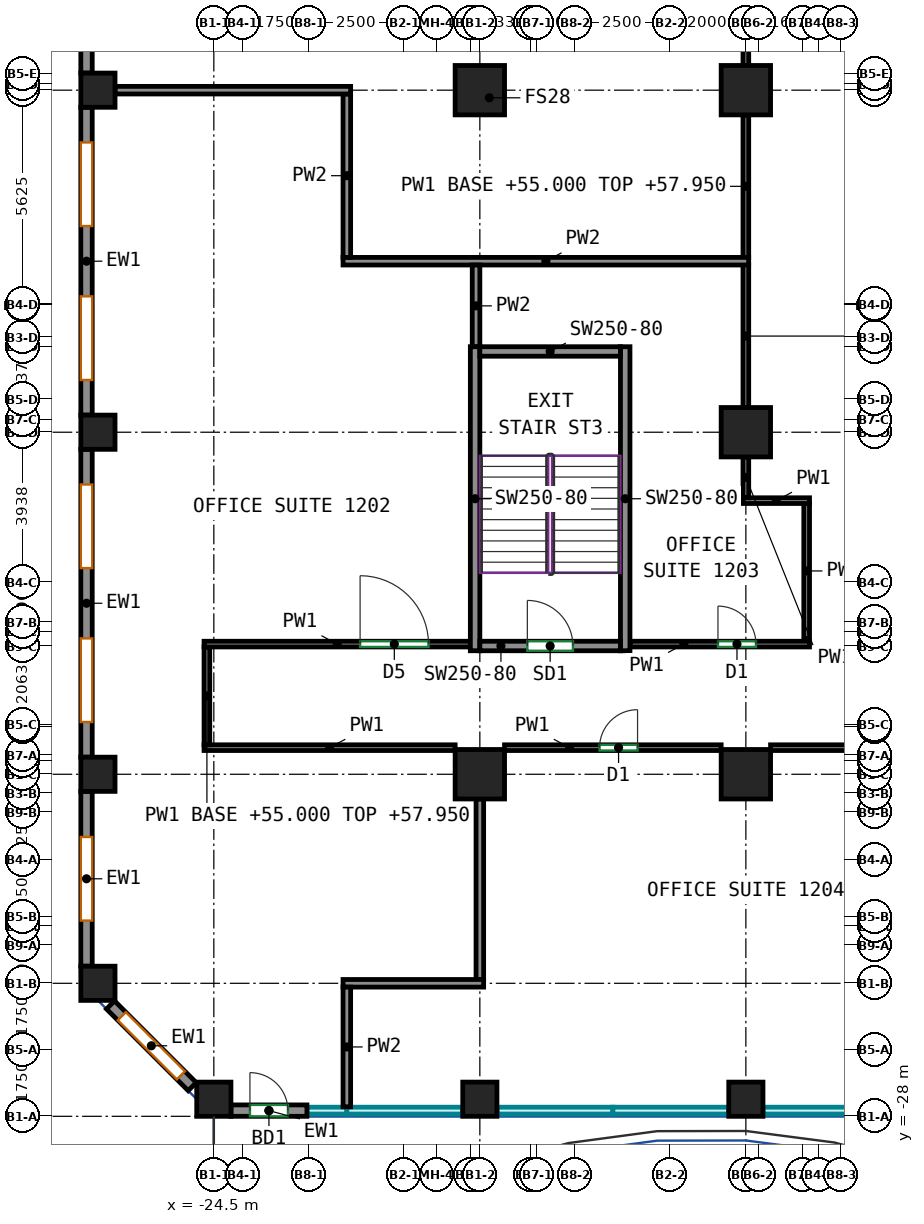
"""IFC4 building model, lengths in metres.
Left out: names, types, materials, properties, quantities, classifications, styles, units other than length and angle.
Written with IfcOpenShell. Run it as: python <this file> out.ifc"""

import sys

from ifc_helpers import new_model, si_unit, direction, frame, frame_2d, origin, origin_2d, place, context, subcontext, project, spatial, rectangle, extrude, source, transform, mapped, element, fill, save


model = new_model("IFC4")
c1 = context("Model", 3, precision=1e-05, world=origin(), true_north=direction((0.0, 1.0)))
c2 = subcontext(c1, "Body", "Model", "MODEL_VIEW")
j1 = project(units=[si_unit("LENGTHUNIT", "METRE"), si_unit("PLANEANGLEUNIT", "RADIAN")], contexts=[c1])
p1 = place(None, origin())
s1 = spatial("IfcSite", under=j1, at=p1, CompositionType="ELEMENT")
p2 = place(p1, origin())
s2 = spatial("IfcBuilding", under=s1, at=p2, CompositionType="ELEMENT")
p3 = place(p2, frame((0.0, 0.0, 55.0)))
s3 = spatial("IfcBuildingStorey", under=s2, at=p3, CompositionType="ELEMENT", Elevation=55.0)
m1 = source(origin(), c2, "Body", "SweptSolid", [
    extrude(rectangle(XDim=0.9, YDim=0.9, at=origin_2d()), origin(), (0.0, 0.0, 1.0), 3.6),
])
for number, where, z_axis, x_axis in (
    (1, (-27.55, -24.5, 0.0), (0.0, 0.0, 1.0), (1.0, 0.0, 0.0)),
    (2, (-27.55, -19.0, 0.0), (0.0, 0.0, 1.0), (1.0, 0.0, 0.0)),
    (3, (-27.55, -10.0, 0.0), (0.0, 0.0, 1.0), (1.0, 0.0, 0.0)),
    (4, (-27.55, -1.0, 0.0), (0.0, 0.0, 1.0), (1.0, 0.0, 0.0)),
    (5, (-24.5, -27.55, 0.0), (0.0, 0.0, 1.0), (1.0, 0.0, 0.0)),
    (6, (-17.5, -27.55, 0.0), (0.0, 0.0, 1.0), (1.0, 0.0, 0.0)),
):
    element("IfcColumn", number, at=place(p3, frame(where, z_axis=z_axis, x_axis=x_axis)), inside=s3, PredefinedType="COLUMN", context=c2, shape_type="MappedRepresentation", body=[
        mapped(m1, transform((0.0, 0.0, 0.0))),
    ])
m2 = source(origin(), c2, "Body", "SweptSolid", [
    extrude(rectangle(XDim=1.3, YDim=1.3, at=origin_2d()), origin(), (0.0, 0.0, 1.0), 3.6),
])
for number, where, z_axis, x_axis in (
    (7, (-17.5, -19.0, 0.0), (0.0, 0.0, 1.0), (1.0, 0.0, 0.0)),
    (8, (-17.5, -1.0, 0.0), (0.0, 0.0, 1.0), (1.0, 0.0, 0.0)),
):
    element("IfcColumn", number, at=place(p3, frame(where, z_axis=z_axis, x_axis=x_axis)), inside=s3, PredefinedType="COLUMN", context=c2, shape_type="MappedRepresentation", body=[
        mapped(m2, transform((0.0, 0.0, 0.0))),
    ])
p4 = place(p3, frame((-10.5, -27.55, 0.0), z_axis=(0.0, 0.0, 1.0), x_axis=(1.0, 0.0, 0.0)))
e9 = element("IfcColumn", 9, at=p4, inside=s3, PredefinedType="COLUMN", context=c2, shape_type="MappedRepresentation", body=[
    mapped(m1, transform((0.0, 0.0, 0.0))),
])
for number, where, z_axis, x_axis in (
    (10, (-10.5, -19.0, 0.0), (0.0, 0.0, 1.0), (1.0, 0.0, 0.0)),
    (11, (-10.5, -10.0, 0.0), (0.0, 0.0, 1.0), (1.0, 0.0, 0.0)),
    (12, (-10.5, -1.0, 0.0), (0.0, 0.0, 1.0), (1.0, 0.0, 0.0)),
):
    element("IfcColumn", number, at=place(p3, frame(where, z_axis=z_axis, x_axis=x_axis)), inside=s3, PredefinedType="COLUMN", context=c2, shape_type="MappedRepresentation", body=[
        mapped(m2, transform((0.0, 0.0, 0.0))),
    ])
m3 = source(origin(), c2, "Body", "SweptSolid", [
    extrude(rectangle(XDim=8.0, YDim=0.25, at=frame_2d((4.0, 0.0))), origin(), (0.0, 0.0, 1.0), 3.6),
])
for number, where, z_axis, x_axis in (
    (13, (-17.625, -15.75, 0.0), (0.0, 0.0, 1.0), (0.0, 1.0, 0.0)),
    (14, (-13.675, -15.75, 0.0), (0.0, 0.0, 1.0), (0.0, 1.0, 0.0)),
):
    element("IfcWall", number, at=place(p3, frame(where, z_axis=z_axis, x_axis=x_axis)), inside=s3, PredefinedType="SHEAR", context=c2, shape_type="MappedRepresentation", body=[
        mapped(m3, transform((0.0, 0.0, 0.0))),
    ])
m4 = source(origin(), c2, "Body", "SweptSolid", [
    extrude(rectangle(XDim=3.7, YDim=0.25, at=frame_2d((1.85, 0.0))), origin(), (0.0, 0.0, 1.0), 3.6),
])
p5 = place(p3, frame((-17.5, -15.625, 0.0), z_axis=(0.0, 0.0, 1.0), x_axis=(1.0, 0.0, 0.0)))
e15 = element("IfcWall", 15, at=p5, inside=s3, PredefinedType="SHEAR", context=c2, shape_type="MappedRepresentation", body=[
    mapped(m4, transform((0.0, 0.0, 0.0))),
])
p6 = place(p5, frame((1.25, 0.0, 0.0)))
e16 = element("IfcOpeningElement", 16, at=p6, cuts=e15, PredefinedType="OPENING", context=c2, shape_type="SweptSolid", body=[
    extrude(rectangle(XDim=1.2, YDim=2.1, at=frame_2d((0.6, 1.05))), frame((0.0, 0.135, 0.0), z_axis=(0.0, -1.0, 0.0), x_axis=(1.0, 0.0, 0.0)), (0.0, 0.0, 1.0), 0.27),
])
p7 = place(p3, frame((-17.5, -7.875, 0.0), z_axis=(0.0, 0.0, 1.0), x_axis=(1.0, 0.0, 0.0)))
e17 = element("IfcWall", 17, at=p7, inside=s3, PredefinedType="SHEAR", context=c2, shape_type="MappedRepresentation", body=[
    mapped(m4, transform((0.0, 0.0, 0.0))),
])
m5 = source(origin(), c2, "Body", "SweptSolid", [
    extrude(rectangle(XDim=2.0, YDim=0.3, at=frame_2d((1.0, 0.0))), origin(), (0.0, 0.0, 1.0), 3.6),
])
p8 = place(p3, frame((-24.05, -27.85, 0.0), z_axis=(0.0, 0.0, 1.0), x_axis=(1.0, 0.0, 0.0)))
e18 = element("IfcWall", 18, at=p8, inside=s3, PredefinedType="SOLIDWALL", context=c2, shape_type="MappedRepresentation", body=[
    mapped(m5, transform((0.0, 0.0, 0.0))),
])
p9 = place(p8, frame((0.5, 0.0, 0.0)))
e19 = element("IfcOpeningElement", 19, at=p9, cuts=e18, PredefinedType="OPENING", context=c2, shape_type="SweptSolid", body=[
    extrude(rectangle(XDim=1.0, YDim=2.1, at=frame_2d((0.5, 1.05))), frame((0.0, 0.16, 0.0), z_axis=(0.0, -1.0, 0.0), x_axis=(1.0, 0.0, 0.0)), (0.0, 0.0, 1.0), 0.32),
])
m6 = source(origin(), c2, "Body", "SweptSolid", [
    extrude(rectangle(XDim=8.1, YDim=0.3, at=frame_2d((4.05, 0.0))), origin(), (0.0, 0.0, 1.0), 3.6),
])
p10 = place(p3, frame((-27.85, 7.55, 0.0), z_axis=(0.0, 0.0, 1.0), x_axis=(0.0, -1.0, 0.0)))
e20 = element("IfcWall", 20, at=p10, inside=s3, PredefinedType="SOLIDWALL", context=c2, shape_type="MappedRepresentation", body=[
    mapped(m6, transform((0.0, 0.0, 0.0))),
])
p11 = place(p10, frame((0.925, 0.0, 0.7)))
e21 = element("IfcOpeningElement", 21, at=p11, cuts=e20, PredefinedType="OPENING", context=c2, shape_type="SweptSolid", body=[
    extrude(rectangle(XDim=2.2, YDim=2.25, at=frame_2d((1.1, 1.125))), frame((0.0, 0.16, 0.0), z_axis=(0.0, -1.0, 0.0), x_axis=(1.0, 0.0, 0.0)), (0.0, 0.0, 1.0), 0.32),
])
p12 = place(p10, frame((4.975, 0.0, 0.7)))
e22 = element("IfcOpeningElement", 22, at=p12, cuts=e20, PredefinedType="OPENING", context=c2, shape_type="SweptSolid", body=[
    extrude(rectangle(XDim=2.2, YDim=2.25, at=frame_2d((1.1, 1.125))), frame((0.0, 0.16, 0.0), z_axis=(0.0, -1.0, 0.0), x_axis=(1.0, 0.0, 0.0)), (0.0, 0.0, 1.0), 0.32),
])
p13 = place(p3, frame((-27.85, -1.45, 0.0), z_axis=(0.0, 0.0, 1.0), x_axis=(0.0, -1.0, 0.0)))
e23 = element("IfcWall", 23, at=p13, inside=s3, PredefinedType="SOLIDWALL", context=c2, shape_type="MappedRepresentation", body=[
    mapped(m6, transform((0.0, 0.0, 0.0))),
])
p14 = place(p13, frame((0.925, 0.0, 0.7)))
e24 = element("IfcOpeningElement", 24, at=p14, cuts=e23, PredefinedType="OPENING", context=c2, shape_type="SweptSolid", body=[
    extrude(rectangle(XDim=2.2, YDim=2.25, at=frame_2d((1.1, 1.125))), frame((0.0, 0.16, 0.0), z_axis=(0.0, -1.0, 0.0), x_axis=(1.0, 0.0, 0.0)), (0.0, 0.0, 1.0), 0.32),
])
p15 = place(p13, frame((4.975, 0.0, 0.7)))
e25 = element("IfcOpeningElement", 25, at=p15, cuts=e23, PredefinedType="OPENING", context=c2, shape_type="SweptSolid", body=[
    extrude(rectangle(XDim=2.2, YDim=2.25, at=frame_2d((1.1, 1.125))), frame((0.0, 0.16, 0.0), z_axis=(0.0, -1.0, 0.0), x_axis=(1.0, 0.0, 0.0)), (0.0, 0.0, 1.0), 0.32),
])
p16 = place(p3, frame((-27.85, -10.45, 0.0), z_axis=(0.0, 0.0, 1.0), x_axis=(0.0, -1.0, 0.0)))
e26 = element("IfcWall", 26, at=p16, inside=s3, PredefinedType="SOLIDWALL", context=c2, shape_type="MappedRepresentation", body=[
    mapped(m6, transform((0.0, 0.0, 0.0))),
])
p17 = place(p16, frame((0.925, 0.0, 0.7)))
e27 = element("IfcOpeningElement", 27, at=p17, cuts=e26, PredefinedType="OPENING", context=c2, shape_type="SweptSolid", body=[
    extrude(rectangle(XDim=2.2, YDim=2.25, at=frame_2d((1.1, 1.125))), frame((0.0, 0.16, 0.0), z_axis=(0.0, -1.0, 0.0), x_axis=(1.0, 0.0, 0.0)), (0.0, 0.0, 1.0), 0.32),
])
p18 = place(p16, frame((4.975, 0.0, 0.7)))
e28 = element("IfcOpeningElement", 28, at=p18, cuts=e26, PredefinedType="OPENING", context=c2, shape_type="SweptSolid", body=[
    extrude(rectangle(XDim=2.2, YDim=2.25, at=frame_2d((1.1, 1.125))), frame((0.0, 0.16, 0.0), z_axis=(0.0, -1.0, 0.0), x_axis=(1.0, 0.0, 0.0)), (0.0, 0.0, 1.0), 0.32),
])
m7 = source(origin(), c2, "Body", "SweptSolid", [
    extrude(rectangle(XDim=4.6, YDim=0.3, at=frame_2d((2.3, 0.0))), origin(), (0.0, 0.0, 1.0), 3.6),
])
p19 = place(p3, frame((-27.85, -19.45, 0.0), z_axis=(0.0, 0.0, 1.0), x_axis=(0.0, -1.0, 0.0)))
e29 = element("IfcWall", 29, at=p19, inside=s3, PredefinedType="SOLIDWALL", context=c2, shape_type="MappedRepresentation", body=[
    mapped(m7, transform((0.0, 0.0, 0.0))),
])
p20 = place(p19, frame((1.2, 0.0, 0.7)))
e30 = element("IfcOpeningElement", 30, at=p20, cuts=e29, PredefinedType="OPENING", context=c2, shape_type="SweptSolid", body=[
    extrude(rectangle(XDim=2.2, YDim=2.25, at=frame_2d((1.1, 1.125))), frame((0.0, 0.16, 0.0), z_axis=(0.0, -1.0, 0.0), x_axis=(1.0, 0.0, 0.0)), (0.0, 0.0, 1.0), 0.32),
])
m8 = source(origin(), c2, "Body", "SweptSolid", [
    extrude(rectangle(XDim=3.041, YDim=0.3, at=frame_2d((1.521, 0.0))), origin(), (0.0, 0.0, 1.0), 3.6),
])
p21 = place(p3, frame((-27.219, -25.069, 0.0), z_axis=(0.0, 0.0, 1.0), x_axis=(0.707106781187, -0.707106781187, 0.0)))
e31 = element("IfcWall", 31, at=p21, inside=s3, PredefinedType="SOLIDWALL", context=c2, shape_type="MappedRepresentation", body=[
    mapped(m8, transform((0.0, 0.0, 0.0))),
])
p22 = place(p21, frame((0.42, 0.0, 0.7)))
e32 = element("IfcOpeningElement", 32, at=p22, cuts=e31, PredefinedType="OPENING", context=c2, shape_type="SweptSolid", body=[
    extrude(rectangle(XDim=2.2, YDim=2.25, at=frame_2d((1.1, 1.125))), frame((0.0, 0.16, 0.0), z_axis=(0.0, -1.0, 0.0), x_axis=(1.0, 0.0, 0.0)), (0.0, 0.0, 1.0), 0.32),
])
p23 = place(p3, frame((-10.5, -5.41, 0.0), z_axis=(0.0, 0.0, 1.0), x_axis=(0.0, 1.0, 0.0)))
e33 = element("IfcWall", 33, at=p23, inside=s3, PredefinedType="PARTITIONING", context=c2, shape_type="SweptSolid", body=[
    extrude(rectangle(XDim=3.76, YDim=0.15, at=frame_2d((1.88, 0.0))), origin(), (0.0, 0.0, 1.0), 2.95),
])
p24 = place(p3, frame((-10.5, -0.35, 0.0), z_axis=(0.0, 0.0, 1.0), x_axis=(0.0, 1.0, 0.0)))
e34 = element("IfcWall", 34, at=p24, inside=s3, PredefinedType="PARTITIONING", context=c2, shape_type="SweptSolid", body=[
    extrude(rectangle(XDim=3.775, YDim=0.15, at=frame_2d((1.888, 0.0))), origin(), (0.0, 0.0, 1.0), 3.6),
])
p25 = place(p3, frame((-24.757, -18.3, 0.0), z_axis=(0.0, 0.0, 1.0), x_axis=(1.0, 0.0, 0.0)))
e35 = element("IfcWall", 35, at=p25, inside=s3, PredefinedType="PARTITIONING", context=c2, shape_type="SweptSolid", body=[
    extrude(rectangle(XDim=6.607, YDim=0.15, at=frame_2d((3.304, 0.0))), origin(), (0.0, 0.0, 1.0), 3.6),
])
p26 = place(p3, frame((-24.682, -15.65, 0.0), z_axis=(0.0, 0.0, 1.0), x_axis=(0.0, -1.0, 0.0)))
e36 = element("IfcWall", 36, at=p26, inside=s3, PredefinedType="PARTITIONING", context=c2, shape_type="SweptSolid", body=[
    extrude(rectangle(XDim=2.575, YDim=0.15, at=frame_2d((1.288, 0.0))), origin(), (0.0, 0.0, 1.0), 2.95),
])
p27 = place(p3, frame((-24.757, -15.575, 0.0), z_axis=(0.0, 0.0, 1.0), x_axis=(1.0, 0.0, 0.0)))
e37 = element("IfcWall", 37, at=p27, inside=s3, PredefinedType="PARTITIONING", context=c2, shape_type="SweptSolid", body=[
    extrude(rectangle(XDim=7.007, YDim=0.15, at=frame_2d((3.503, 0.0))), origin(), (0.0, 0.0, 1.0), 3.6),
])
p28 = place(p27, frame((4.106, 0.0, 0.0)))
e38 = element("IfcOpeningElement", 38, at=p28, cuts=e37, PredefinedType="OPENING", context=c2, shape_type="SweptSolid", body=[
    extrude(rectangle(XDim=1.8, YDim=2.1, at=frame_2d((0.9, 1.05))), frame((0.0, 0.085, 0.0), z_axis=(0.0, -1.0, 0.0), x_axis=(1.0, 0.0, 0.0)), (0.0, 0.0, 1.0), 0.17),
])
p29 = place(p3, frame((-13.55, -15.575, 0.0), z_axis=(0.0, 0.0, 1.0), x_axis=(1.0, 0.0, 0.0)))
e39 = element("IfcWall", 39, at=p29, inside=s3, PredefinedType="PARTITIONING", context=c2, shape_type="SweptSolid", body=[
    extrude(rectangle(XDim=4.725, YDim=0.15, at=frame_2d((2.363, 0.0))), origin(), (0.0, 0.0, 1.0), 3.6),
])
p30 = place(p29, frame((2.316, 0.0, 0.0)))
e40 = element("IfcOpeningElement", 40, at=p30, cuts=e39, PredefinedType="OPENING", context=c2, shape_type="SweptSolid", body=[
    extrude(rectangle(XDim=1.0, YDim=2.1, at=frame_2d((0.5, 1.05))), frame((0.0, 0.085, 0.0), z_axis=(0.0, -1.0, 0.0), x_axis=(1.0, 0.0, 0.0)), (0.0, 0.0, 1.0), 0.17),
])
p31 = place(p3, frame((-8.9, -11.875, 0.0), z_axis=(0.0, 0.0, 1.0), x_axis=(0.0, -1.0, 0.0)))
e41 = element("IfcWall", 41, at=p31, inside=s3, PredefinedType="PARTITIONING", context=c2, shape_type="SweptSolid", body=[
    extrude(rectangle(XDim=3.55, YDim=0.15, at=frame_2d((1.775, 0.0))), origin(), (0.0, 0.0, 1.0), 3.6),
])
p32 = place(p3, frame((-10.575, -11.8, 0.0), z_axis=(0.0, 0.0, 1.0), x_axis=(1.0, 0.0, 0.0)))
e42 = element("IfcWall", 42, at=p32, inside=s3, PredefinedType="PARTITIONING", context=c2, shape_type="SweptSolid", body=[
    extrude(rectangle(XDim=1.75, YDim=0.15, at=frame_2d((0.875, 0.0))), origin(), (0.0, 0.0, 1.0), 3.6),
])
p33 = place(p3, frame((-10.5, -11.725, 0.0), z_axis=(0.0, 0.0, 1.0), x_axis=(0.0, 1.0, 0.0)))
e43 = element("IfcWall", 43, at=p33, inside=s3, PredefinedType="PARTITIONING", context=c2, shape_type="SweptSolid", body=[
    extrude(rectangle(XDim=1.075, YDim=0.15, at=frame_2d((0.538, 0.0))), origin(), (0.0, 0.0, 1.0), 2.95),
])
p34 = place(p3, frame((-10.5, -9.35, 0.0), z_axis=(0.0, 0.0, 1.0), x_axis=(0.0, 1.0, 0.0)))
e44 = element("IfcWall", 44, at=p34, inside=s3, PredefinedType="PARTITIONING", context=c2, shape_type="SweptSolid", body=[
    extrude(rectangle(XDim=3.76, YDim=0.15, at=frame_2d((1.88, 0.0))), origin(), (0.0, 0.0, 1.0), 2.95),
])
p35 = place(p3, frame((-16.85, -18.3, 0.0), z_axis=(0.0, 0.0, 1.0), x_axis=(1.0, 0.0, 0.0)))
e45 = element("IfcWall", 45, at=p35, inside=s3, PredefinedType="PARTITIONING", context=c2, shape_type="SweptSolid", body=[
    extrude(rectangle(XDim=5.7, YDim=0.15, at=frame_2d((2.85, 0.0))), origin(), (0.0, 0.0, 1.0), 3.6),
])
p36 = place(p35, frame((2.5, 0.0, 0.0)))
e46 = element("IfcOpeningElement", 46, at=p36, cuts=e45, PredefinedType="OPENING", context=c2, shape_type="SweptSolid", body=[
    extrude(rectangle(XDim=1.0, YDim=2.1, at=frame_2d((0.5, 1.05))), frame((0.0, 0.085, 0.0), z_axis=(0.0, -1.0, 0.0), x_axis=(1.0, 0.0, 0.0)), (0.0, 0.0, 1.0), 0.17),
])
p37 = place(p3, frame((-9.85, -18.3, 0.0), z_axis=(0.0, 0.0, 1.0), x_axis=(1.0, 0.0, 0.0)))
e47 = element("IfcWall", 47, at=p37, inside=s3, PredefinedType="PARTITIONING", context=c2, shape_type="SweptSolid", body=[
    extrude(rectangle(XDim=5.7, YDim=0.15, at=frame_2d((2.85, 0.0))), origin(), (0.0, 0.0, 1.0), 3.6),
])
p38 = place(p3, frame((-21.1, -5.5, 0.0), z_axis=(0.0, 0.0, 1.0), x_axis=(1.0, 0.0, 0.0)))
e48 = element("IfcWall", 48, at=p38, inside=s3, PredefinedType="PARTITIONING", context=c2, shape_type="SweptSolid", body=[
    extrude(rectangle(XDim=10.674, YDim=0.2, at=frame_2d((5.337, 0.0))), origin(), (0.0, 0.0, 1.0), 3.6),
])
p39 = place(p3, frame((-21.0, -5.4, 0.0), z_axis=(0.0, 0.0, 1.0), x_axis=(0.0, 1.0, 0.0)))
e49 = element("IfcWall", 49, at=p39, inside=s3, PredefinedType="PARTITIONING", context=c2, shape_type="SweptSolid", body=[
    extrude(rectangle(XDim=4.3, YDim=0.2, at=frame_2d((2.15, 0.0))), origin(), (0.0, 0.0, 1.0), 3.6),
])
p40 = place(p3, frame((-27.1, -1.0, 0.0), z_axis=(0.0, 0.0, 1.0), x_axis=(1.0, 0.0, 0.0)))
e50 = element("IfcWall", 50, at=p40, inside=s3, PredefinedType="PARTITIONING", context=c2, shape_type="SweptSolid", body=[
    extrude(rectangle(XDim=6.2, YDim=0.2, at=frame_2d((3.1, 0.0))), origin(), (0.0, 0.0, 1.0), 2.95),
])
p41 = place(p3, frame((-17.6, -7.75, 0.0), z_axis=(0.0, 0.0, 1.0), x_axis=(0.0, 1.0, 0.0)))
e51 = element("IfcWall", 51, at=p41, inside=s3, PredefinedType="PARTITIONING", context=c2, shape_type="SweptSolid", body=[
    extrude(rectangle(XDim=2.15, YDim=0.2, at=frame_2d((1.075, 0.0))), origin(), (0.0, 0.0, 1.0), 3.6),
])
p42 = place(p3, frame((-17.5, -24.4, 0.0), z_axis=(0.0, 0.0, 1.0), x_axis=(0.0, 1.0, 0.0)))
e52 = element("IfcWall", 52, at=p42, inside=s3, PredefinedType="PARTITIONING", context=c2, shape_type="SweptSolid", body=[
    extrude(rectangle(XDim=4.75, YDim=0.2, at=frame_2d((2.375, 0.0))), origin(), (0.0, 0.0, 1.0), 2.95),
])
p43 = place(p3, frame((-21.1, -24.5, 0.0), z_axis=(0.0, 0.0, 1.0), x_axis=(1.0, 0.0, 0.0)))
e53 = element("IfcWall", 53, at=p43, inside=s3, PredefinedType="PARTITIONING", context=c2, shape_type="SweptSolid", body=[
    extrude(rectangle(XDim=3.7, YDim=0.2, at=frame_2d((1.85, 0.0))), origin(), (0.0, 0.0, 1.0), 2.95),
])
p44 = place(p3, frame((-21.0, -27.75, 0.0), z_axis=(0.0, 0.0, 1.0), x_axis=(0.0, 1.0, 0.0)))
e54 = element("IfcWall", 54, at=p44, inside=s3, PredefinedType="PARTITIONING", context=c2, shape_type="SweptSolid", body=[
    extrude(rectangle(XDim=3.15, YDim=0.2, at=frame_2d((1.575, 0.0))), origin(), (0.0, 0.0, 1.0), 3.6),
])
p45 = place(p9, origin())
e55 = element("IfcDoor", 55, at=p45, inside=s3, OperationType="SINGLE_SWING_LEFT", PredefinedType="DOOR", context=c2, shape_type="SweptSolid", body=[
    extrude(rectangle(XDim=1.0, YDim=2.1, at=frame_2d((0.5, 1.05))), frame((0.0, 0.025, 0.0), z_axis=(0.0, -1.0, 0.0), x_axis=(1.0, 0.0, 0.0)), (0.0, 0.0, 1.0), 0.05),
])
fill(e19, e55)
p46 = place(p14, origin())
e56 = element("IfcWindow", 56, at=p46, inside=s3, PartitioningType="SINGLE_PANEL", PredefinedType="WINDOW", context=c2, shape_type="SweptSolid", body=[
    extrude(rectangle(XDim=2.2, YDim=2.25, at=frame_2d((1.1, 1.125))), frame((0.0, 0.03, 0.0), z_axis=(0.0, -1.0, 0.0), x_axis=(1.0, 0.0, 0.0)), (0.0, 0.0, 1.0), 0.06),
])
fill(e24, e56)
p47 = place(p15, origin())
e57 = element("IfcWindow", 57, at=p47, inside=s3, PartitioningType="SINGLE_PANEL", PredefinedType="WINDOW", context=c2, shape_type="SweptSolid", body=[
    extrude(rectangle(XDim=2.2, YDim=2.25, at=frame_2d((1.1, 1.125))), frame((0.0, 0.03, 0.0), z_axis=(0.0, -1.0, 0.0), x_axis=(1.0, 0.0, 0.0)), (0.0, 0.0, 1.0), 0.06),
])
fill(e25, e57)
p48 = place(p17, origin())
e58 = element("IfcWindow", 58, at=p48, inside=s3, PartitioningType="SINGLE_PANEL", PredefinedType="WINDOW", context=c2, shape_type="SweptSolid", body=[
    extrude(rectangle(XDim=2.2, YDim=2.25, at=frame_2d((1.1, 1.125))), frame((0.0, 0.03, 0.0), z_axis=(0.0, -1.0, 0.0), x_axis=(1.0, 0.0, 0.0)), (0.0, 0.0, 1.0), 0.06),
])
fill(e27, e58)
p49 = place(p18, origin())
e59 = element("IfcWindow", 59, at=p49, inside=s3, PartitioningType="SINGLE_PANEL", PredefinedType="WINDOW", context=c2, shape_type="SweptSolid", body=[
    extrude(rectangle(XDim=2.2, YDim=2.25, at=frame_2d((1.1, 1.125))), frame((0.0, 0.03, 0.0), z_axis=(0.0, -1.0, 0.0), x_axis=(1.0, 0.0, 0.0)), (0.0, 0.0, 1.0), 0.06),
])
fill(e28, e59)
p50 = place(p20, origin())
e60 = element("IfcWindow", 60, at=p50, inside=s3, PartitioningType="SINGLE_PANEL", PredefinedType="WINDOW", context=c2, shape_type="SweptSolid", body=[
    extrude(rectangle(XDim=2.2, YDim=2.25, at=frame_2d((1.1, 1.125))), frame((0.0, 0.03, 0.0), z_axis=(0.0, -1.0, 0.0), x_axis=(1.0, 0.0, 0.0)), (0.0, 0.0, 1.0), 0.06),
])
fill(e30, e60)
p51 = place(p22, origin())
e61 = element("IfcWindow", 61, at=p51, inside=s3, PartitioningType="SINGLE_PANEL", PredefinedType="WINDOW", context=c2, shape_type="SweptSolid", body=[
    extrude(rectangle(XDim=2.2, YDim=2.25, at=frame_2d((1.1, 1.125))), frame((0.0, 0.03, 0.0), z_axis=(0.0, -1.0, 0.0), x_axis=(1.0, 0.0, 0.0)), (0.0, 0.0, 1.0), 0.06),
])
fill(e32, e61)
p52 = place(p6, origin())
e62 = element("IfcDoor", 62, at=p52, inside=s3, OperationType="DOUBLE_DOOR_SINGLE_SWING", PredefinedType="DOOR", context=c2, shape_type="SweptSolid", body=[
    extrude(rectangle(XDim=1.2, YDim=2.1, at=frame_2d((0.6, 1.05))), frame((0.0, 0.025, 0.0), z_axis=(0.0, -1.0, 0.0), x_axis=(1.0, 0.0, 0.0)), (0.0, 0.0, 1.0), 0.05),
])
fill(e16, e62)
p53 = place(p36, origin())
e63 = element("IfcDoor", 63, at=p53, inside=s3, OperationType="SINGLE_SWING_RIGHT", PredefinedType="DOOR", context=c2, shape_type="SweptSolid", body=[
    extrude(rectangle(XDim=1.0, YDim=2.1, at=frame_2d((0.5, 1.05))), frame((0.0, 0.025, 0.0), z_axis=(0.0, -1.0, 0.0), x_axis=(1.0, 0.0, 0.0)), (0.0, 0.0, 1.0), 0.05),
])
fill(e46, e63)
p54 = place(p28, origin())
e64 = element("IfcDoor", 64, at=p54, inside=s3, OperationType="DOUBLE_DOOR_SINGLE_SWING", PredefinedType="DOOR", context=c2, shape_type="SweptSolid", body=[
    extrude(rectangle(XDim=1.8, YDim=2.1, at=frame_2d((0.9, 1.05))), frame((0.0, 0.025, 0.0), z_axis=(0.0, -1.0, 0.0), x_axis=(1.0, 0.0, 0.0)), (0.0, 0.0, 1.0), 0.05),
])
fill(e38, e64)
p55 = place(p30, origin())
e65 = element("IfcDoor", 65, at=p55, inside=s3, OperationType="SINGLE_SWING_LEFT", PredefinedType="DOOR", context=c2, shape_type="SweptSolid", body=[
    extrude(rectangle(XDim=1.0, YDim=2.1, at=frame_2d((0.5, 1.05))), frame((0.0, 0.025, 0.0), z_axis=(0.0, -1.0, 0.0), x_axis=(1.0, 0.0, 0.0)), (0.0, 0.0, 1.0), 0.05),
])
fill(e40, e65)
save(model, sys.argv[1])
